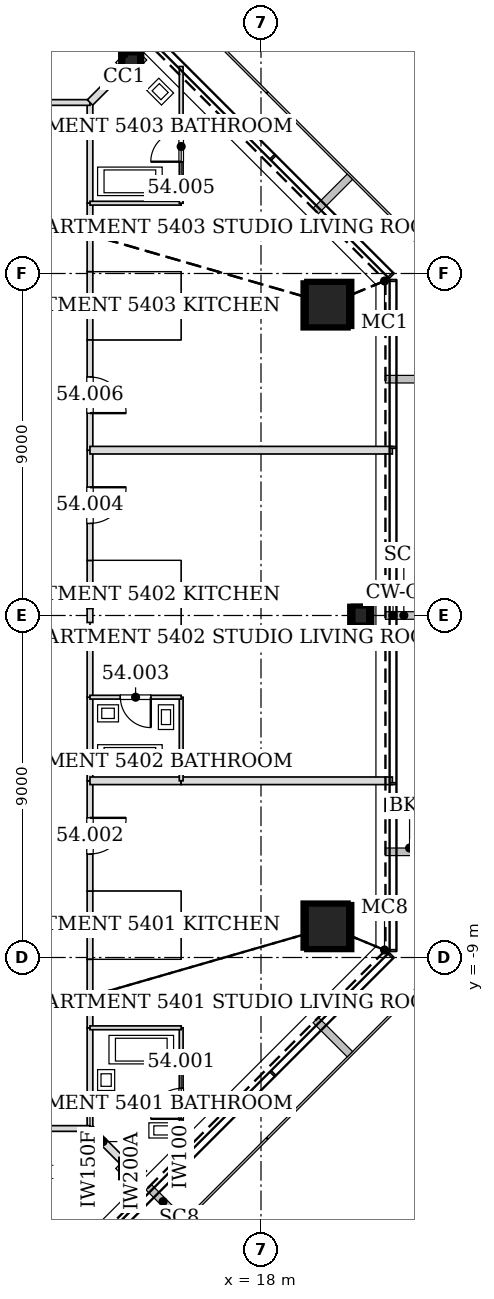
"""IFC4 building model, lengths in metres.
Left out: names, types, materials, properties, quantities, classifications, styles, units other than length and angle.
Written with IfcOpenShell. Run it as: python <this file> out.ifc"""

import sys

from ifc_helpers import new_model, si_unit, direction, frame, frame_2d, origin, origin_2d, place, context, subcontext, project, spatial, rectangle, hollow_rectangle, extrude, element, fill, save


model = new_model("IFC4")
c1 = context("Model", 3, precision=1e-05, world=origin(), true_north=direction((0.0, 1.0)))
c2 = subcontext(c1, "Body", "Model", "MODEL_VIEW")
j1 = project(units=[si_unit("LENGTHUNIT", "METRE"), si_unit("PLANEANGLEUNIT", "RADIAN")], contexts=[c1])
p1 = place(None, origin())
s1 = spatial("IfcSite", under=j1, at=p1, CompositionType="ELEMENT")
p2 = place(p1, origin())
s2 = spatial("IfcBuilding", under=s1, at=p2, CompositionType="ELEMENT")
p3 = place(p2, frame((0.0, 0.0, 231.2)))
s3 = spatial("IfcBuildingStorey", under=s2, at=p3, CompositionType="ELEMENT", Elevation=231.2)
for number, where, z_axis, x_axis in (
    (1, (19.796, 8.2, 0.0), (-0.028, -0.012, 1.0), (0.384, -0.923, 0.0)),
    (2, (19.796, -8.2, 0.0), (-0.028, 0.012, 1.0), (-0.384, -0.923, 0.0)),
):
    element("IfcColumn", number, at=place(p3, frame(where, z_axis=z_axis, x_axis=x_axis)), inside=s3, PredefinedType="COLUMN", context=c2, shape_type="SweptSolid", body=[
        extrude(hollow_rectangle(XDim=1.2, YDim=1.2, WallThickness=0.055, at=origin_2d()), origin(), (0.0, 0.0, 1.0), 3.402),
    ])
for number, where, z_axis, x_axis in (
    (3, (20.674, 0.0, 0.0), (-0.028, 0.0, 1.0), (0.0, -1.0, 0.0)),
    (4, (14.619, 14.619, 0.0), (-0.02, -0.02, 1.0), (0.707, -0.707, 0.0)),
    (5, (14.619, -14.619, 0.0), (-0.02, 0.02, 1.0), (-0.707, -0.707, 0.0)),
):
    element("IfcColumn", number, at=place(p3, frame(where, z_axis=z_axis, x_axis=x_axis)), inside=s3, PredefinedType="COLUMN", context=c2, shape_type="SweptSolid", body=[
        extrude(hollow_rectangle(XDim=0.5, YDim=0.5, WallThickness=0.025, at=origin_2d()), origin(), (0.0, 0.0, 1.0), 3.402),
    ])
p4 = place(p3, frame((13.5, -13.5, 0.0), z_axis=(0.0, 0.0, 1.0), x_axis=(0.0, 1.0, 0.0)))
e6 = element("IfcWall", 6, at=p4, inside=s3, PredefinedType="PARTITIONING", context=c2, shape_type="SweptSolid", body=[
    extrude(rectangle(XDim=2.651, YDim=0.15, at=frame_2d((1.325, 0.0))), origin(), (0.0, 0.0, 1.0), 2.583),
])
p5 = place(p3, frame((13.5, -9.051, 0.0), z_axis=(0.0, 0.0, 1.0), x_axis=(0.0, 1.0, 0.0)))
e7 = element("IfcWall", 7, at=p5, inside=s3, PredefinedType="PARTITIONING", context=c2, shape_type="SweptSolid", body=[
    extrude(rectangle(XDim=1.802, YDim=0.15, at=frame_2d((0.901, 0.0))), origin(), (0.0, 0.0, 1.0), 3.2),
])
p6 = place(p3, frame((13.5, -10.851, 0.0), z_axis=(0.0, 0.0, 1.0), x_axis=(0.0, 1.0, 0.0)))
e8 = element("IfcWall", 8, at=p6, inside=s3, PredefinedType="PARTITIONING", context=c2, shape_type="SweptSolid", body=[
    extrude(rectangle(XDim=1.802, YDim=0.15, at=frame_2d((0.901, 0.0))), origin(), (0.0, 0.0, 1.0), 2.344),
])
p7 = place(p3, frame((13.5, -7.251, 0.0), z_axis=(0.0, 0.0, 1.0), x_axis=(0.0, 1.0, 0.0)))
e9 = element("IfcWall", 9, at=p7, inside=s3, PredefinedType="PARTITIONING", context=c2, shape_type="SweptSolid", body=[
    extrude(rectangle(XDim=2.902, YDim=0.15, at=frame_2d((1.451, 0.0))), origin(), (0.0, 0.0, 1.0), 3.2),
])
p8 = place(p7, frame((0.976, 0.0, 0.0)))
e10 = element("IfcOpeningElement", 10, at=p8, cuts=e9, PredefinedType="OPENING", context=c2, shape_type="SweptSolid", body=[
    extrude(rectangle(XDim=0.95, YDim=2.1, at=frame_2d((0.475, 1.05))), frame((0.0, 0.085, 0.0), z_axis=(0.0, -1.0, 0.0), x_axis=(1.0, 0.0, 0.0)), (0.0, 0.0, 1.0), 0.17),
])
p9 = place(p3, frame((13.5, -4.351, 0.0), z_axis=(0.0, 0.0, 1.0), x_axis=(0.0, 1.0, 0.0)))
e11 = element("IfcWall", 11, at=p9, inside=s3, PredefinedType="PARTITIONING", context=c2, shape_type="SweptSolid", body=[
    extrude(rectangle(XDim=2.202, YDim=0.15, at=frame_2d((1.101, 0.0))), origin(), (0.0, 0.0, 1.0), 3.2),
])
p10 = place(p3, frame((13.5, 0.184, 0.0), z_axis=(0.0, 0.0, 1.0), x_axis=(0.0, 1.0, 0.0)))
e12 = element("IfcWall", 12, at=p10, inside=s3, PredefinedType="PARTITIONING", context=c2, shape_type="SweptSolid", body=[
    extrude(rectangle(XDim=1.267, YDim=0.15, at=frame_2d((0.634, 0.0))), origin(), (0.0, 0.0, 1.0), 3.2),
])
p11 = place(p3, frame((13.5, -0.184, 0.0), z_axis=(0.0, 0.0, 1.0), x_axis=(0.0, 1.0, 0.0)))
e13 = element("IfcWall", 13, at=p11, inside=s3, PredefinedType="PARTITIONING", context=c2, shape_type="SweptSolid", body=[
    extrude(rectangle(XDim=0.367, YDim=0.15, at=frame_2d((0.184, 0.0))), origin(), (0.0, 0.0, 1.0), 2.253),
])
p12 = place(p3, frame((13.5, -2.151, 0.0), z_axis=(0.0, 0.0, 1.0), x_axis=(0.0, 1.0, 0.0)))
e14 = element("IfcWall", 14, at=p12, inside=s3, PredefinedType="PARTITIONING", context=c2, shape_type="SweptSolid", body=[
    extrude(rectangle(XDim=1.802, YDim=0.15, at=frame_2d((0.901, 0.0))), origin(), (0.0, 0.0, 1.0), 3.2),
])
p13 = place(p3, frame((13.5, 1.449, 0.0), z_axis=(0.0, 0.0, 1.0), x_axis=(0.0, 1.0, 0.0)))
e15 = element("IfcWall", 15, at=p13, inside=s3, PredefinedType="PARTITIONING", context=c2, shape_type="SweptSolid", body=[
    extrude(rectangle(XDim=2.902, YDim=0.15, at=frame_2d((1.451, 0.0))), origin(), (0.0, 0.0, 1.0), 3.2),
])
p14 = place(p13, frame((0.976, 0.0, 0.0)))
e16 = element("IfcOpeningElement", 16, at=p14, cuts=e15, PredefinedType="OPENING", context=c2, shape_type="SweptSolid", body=[
    extrude(rectangle(XDim=0.95, YDim=2.1, at=frame_2d((0.475, 1.05))), frame((0.0, 0.085, 0.0), z_axis=(0.0, -1.0, 0.0), x_axis=(1.0, 0.0, 0.0)), (0.0, 0.0, 1.0), 0.17),
])
p15 = place(p3, frame((13.5, 10.849, 0.0), z_axis=(0.0, 0.0, 1.0), x_axis=(0.0, 1.0, 0.0)))
e17 = element("IfcWall", 17, at=p15, inside=s3, PredefinedType="PARTITIONING", context=c2, shape_type="SweptSolid", body=[
    extrude(rectangle(XDim=2.651, YDim=0.15, at=frame_2d((1.325, 0.0))), origin(), (0.0, 0.0, 1.0), 2.583),
])
p16 = place(p3, frame((13.5, 7.249, 0.0), z_axis=(0.0, 0.0, 1.0), x_axis=(0.0, 1.0, 0.0)))
e18 = element("IfcWall", 18, at=p16, inside=s3, PredefinedType="PARTITIONING", context=c2, shape_type="SweptSolid", body=[
    extrude(rectangle(XDim=1.802, YDim=0.15, at=frame_2d((0.901, 0.0))), origin(), (0.0, 0.0, 1.0), 3.2),
])
p17 = place(p3, frame((13.5, 4.349, 0.0), z_axis=(0.0, 0.0, 1.0), x_axis=(0.0, 1.0, 0.0)))
e19 = element("IfcWall", 19, at=p17, inside=s3, PredefinedType="PARTITIONING", context=c2, shape_type="SweptSolid", body=[
    extrude(rectangle(XDim=2.902, YDim=0.15, at=frame_2d((1.451, 0.0))), origin(), (0.0, 0.0, 1.0), 3.2),
])
p18 = place(p17, frame((0.976, 0.0, 0.0)))
e20 = element("IfcOpeningElement", 20, at=p18, cuts=e19, PredefinedType="OPENING", context=c2, shape_type="SweptSolid", body=[
    extrude(rectangle(XDim=0.95, YDim=2.1, at=frame_2d((0.475, 1.05))), frame((0.0, 0.085, 0.0), z_axis=(0.0, -1.0, 0.0), x_axis=(1.0, 0.0, 0.0)), (0.0, 0.0, 1.0), 0.17),
])
p19 = place(p3, frame((13.5, 9.049, 0.0), z_axis=(0.0, 0.0, 1.0), x_axis=(0.0, 1.0, 0.0)))
e21 = element("IfcWall", 21, at=p19, inside=s3, PredefinedType="PARTITIONING", context=c2, shape_type="SweptSolid", body=[
    extrude(rectangle(XDim=1.802, YDim=0.15, at=frame_2d((0.901, 0.0))), origin(), (0.0, 0.0, 1.0), 2.344),
])
p20 = place(p3, frame((13.5, 13.5, 0.0), z_axis=(0.0, 0.0, 1.0), x_axis=(-1.0, 0.0, 0.0)))
e22 = element("IfcWall", 22, at=p20, inside=s3, PredefinedType="PARTITIONING", context=c2, shape_type="SweptSolid", body=[
    extrude(rectangle(XDim=4.051, YDim=0.15, at=frame_2d((2.025, 0.0))), origin(), (0.0, 0.0, 1.0), 2.344),
])
p21 = place(p3, frame((8.199, -13.5, 0.0), z_axis=(0.0, 0.0, 1.0), x_axis=(1.0, 0.0, 0.0)))
e23 = element("IfcWall", 23, at=p21, inside=s3, PredefinedType="PARTITIONING", context=c2, shape_type="SweptSolid", body=[
    extrude(rectangle(XDim=5.301, YDim=0.15, at=frame_2d((2.65, 0.0))), origin(), (0.0, 0.0, 1.0), 2.344),
])
p22 = place(p3, frame((15.9, -14.448, 0.0), z_axis=(0.0, 0.0, 1.0), x_axis=(0.0, 1.0, 0.0)))
e24 = element("IfcWall", 24, at=p22, inside=s3, PredefinedType="PARTITIONING", context=c2, shape_type="SweptSolid", body=[
    extrude(rectangle(XDim=3.597, YDim=0.1, at=frame_2d((1.799, 0.0))), origin(), (0.0, 0.0, 1.0), 2.784),
])
p23 = place(p22, frame((1.202, 0.0, 0.0)))
e25 = element("IfcOpeningElement", 25, at=p23, cuts=e24, PredefinedType="OPENING", context=c2, shape_type="SweptSolid", body=[
    extrude(rectangle(XDim=0.8, YDim=2.1, at=frame_2d((0.4, 1.05))), frame((0.0, 0.06, 0.0), z_axis=(0.0, -1.0, 0.0), x_axis=(1.0, 0.0, 0.0)), (0.0, 0.0, 1.0), 0.12),
])
p24 = place(p3, frame((15.9, -10.85, 0.0), z_axis=(0.0, 0.0, 1.0), x_axis=(-1.0, 0.0, 0.0)))
e26 = element("IfcWall", 26, at=p24, inside=s3, PredefinedType="PARTITIONING", context=c2, shape_type="SweptSolid", body=[
    extrude(rectangle(XDim=2.4, YDim=0.1, at=frame_2d((1.2, 0.0))), origin(), (0.0, 0.0, 1.0), 2.786),
])
p25 = place(p3, frame((13.5, -13.5, 0.0), z_axis=(0.0, 0.0, 1.0), x_axis=(0.707106781187, -0.707106781187, 0.0)))
e27 = element("IfcWall", 27, at=p25, inside=s3, PredefinedType="PARTITIONING", context=c2, shape_type="SweptSolid", body=[
    extrude(rectangle(XDim=1.217, YDim=0.2, at=frame_2d((0.608, 0.0))), origin(), (0.0, 0.0, 1.0), 2.583),
])
p26 = place(p3, frame((15.901, -4.35, 0.0), z_axis=(0.0, 0.0, 1.0), x_axis=(-1.0, 0.0, 0.0)))
e28 = element("IfcWall", 28, at=p26, inside=s3, PredefinedType="PARTITIONING", context=c2, shape_type="SweptSolid", body=[
    extrude(rectangle(XDim=2.401, YDim=0.2, at=frame_2d((1.2, 0.0))), origin(), (0.0, 0.0, 1.0), 2.664),
])
p27 = place(p3, frame((21.456, -4.35, 0.0), z_axis=(0.0, 0.0, 1.0), x_axis=(-1.0, 0.0, 0.0)))
e29 = element("IfcWall", 29, at=p27, inside=s3, PredefinedType="PARTITIONING", context=c2, shape_type="SweptSolid", body=[
    extrude(rectangle(XDim=5.557, YDim=0.2, at=frame_2d((2.779, 0.0))), origin(), (0.0, 0.0, 1.0), 2.662),
])
p28 = place(p3, frame((15.9, -4.35, 0.0), z_axis=(0.0, 0.0, 1.0), x_axis=(0.0, 1.0, 0.0)))
e30 = element("IfcWall", 30, at=p28, inside=s3, PredefinedType="PARTITIONING", context=c2, shape_type="SweptSolid", body=[
    extrude(rectangle(XDim=2.2, YDim=0.1, at=frame_2d((1.1, 0.0))), origin(), (0.0, 0.0, 1.0), 3.2),
])
p29 = place(p3, frame((15.9, -2.15, 0.0), z_axis=(0.0, 0.0, 1.0), x_axis=(-1.0, 0.0, 0.0)))
e31 = element("IfcWall", 31, at=p29, inside=s3, PredefinedType="PARTITIONING", context=c2, shape_type="SweptSolid", body=[
    extrude(rectangle(XDim=2.4, YDim=0.1, at=frame_2d((1.2, 0.0))), origin(), (0.0, 0.0, 1.0), 2.664),
])
p30 = place(p29, frame((0.8, 0.0, 0.0)))
e32 = element("IfcOpeningElement", 32, at=p30, cuts=e31, PredefinedType="OPENING", context=c2, shape_type="SweptSolid", body=[
    extrude(rectangle(XDim=0.8, YDim=2.1, at=frame_2d((0.4, 1.05))), frame((0.0, 0.06, 0.0), z_axis=(0.0, -1.0, 0.0), x_axis=(1.0, 0.0, 0.0)), (0.0, 0.0, 1.0), 0.12),
])
p31 = place(p3, frame((21.456, 4.35, 0.0), z_axis=(0.0, 0.0, 1.0), x_axis=(-1.0, 0.0, 0.0)))
e33 = element("IfcWall", 33, at=p31, inside=s3, PredefinedType="PARTITIONING", context=c2, shape_type="SweptSolid", body=[
    extrude(rectangle(XDim=7.956, YDim=0.2, at=frame_2d((3.978, 0.0))), origin(), (0.0, 0.0, 1.0), 2.662),
])
p32 = place(p3, frame((13.5, 10.85, 0.0), z_axis=(0.0, 0.0, 1.0), x_axis=(1.0, 0.0, 0.0)))
e34 = element("IfcWall", 34, at=p32, inside=s3, PredefinedType="PARTITIONING", context=c2, shape_type="SweptSolid", body=[
    extrude(rectangle(XDim=2.4, YDim=0.1, at=frame_2d((1.2, 0.0))), origin(), (0.0, 0.0, 1.0), 2.786),
])
p33 = place(p3, frame((15.9, 10.85, 0.0), z_axis=(0.0, 0.0, 1.0), x_axis=(0.0, 1.0, 0.0)))
e35 = element("IfcWall", 35, at=p33, inside=s3, PredefinedType="PARTITIONING", context=c2, shape_type="SweptSolid", body=[
    extrude(rectangle(XDim=3.597, YDim=0.1, at=frame_2d((1.799, 0.0))), origin(), (0.0, 0.0, 1.0), 2.784),
])
p34 = place(p33, frame((1.092, 0.0, 0.0)))
e36 = element("IfcOpeningElement", 36, at=p34, cuts=e35, PredefinedType="OPENING", context=c2, shape_type="SweptSolid", body=[
    extrude(rectangle(XDim=0.8, YDim=2.1, at=frame_2d((0.4, 1.05))), frame((0.0, 0.06, 0.0), z_axis=(0.0, -1.0, 0.0), x_axis=(1.0, 0.0, 0.0)), (0.0, 0.0, 1.0), 0.12),
])
p35 = place(p3, frame((14.361, 14.361, 0.0), z_axis=(0.0, 0.0, 1.0), x_axis=(-0.707106781187, -0.707106781187, 0.0)))
e37 = element("IfcWall", 37, at=p35, inside=s3, PredefinedType="PARTITIONING", context=c2, shape_type="SweptSolid", body=[
    extrude(rectangle(XDim=1.217, YDim=0.2, at=frame_2d((0.608, 0.0))), origin(), (0.0, 0.0, 1.0), 2.583),
])
p36 = place(p23, origin())
e38 = element("IfcDoor", 38, at=p36, inside=s3, OperationType="SINGLE_SWING_LEFT", PredefinedType="DOOR", context=c2, shape_type="SweptSolid", body=[
    extrude(rectangle(XDim=0.8, YDim=2.1, at=frame_2d((0.4, 1.05))), frame((0.0, 0.025, 0.0), z_axis=(0.0, -1.0, 0.0), x_axis=(1.0, 0.0, 0.0)), (0.0, 0.0, 1.0), 0.05),
])
fill(e25, e38)
p37 = place(p8, frame((0.95, 0.0, 0.0), z_axis=(0.0, 0.0, 1.0), x_axis=(-1.0, 0.0, 0.0)))
e39 = element("IfcDoor", 39, at=p37, inside=s3, OperationType="SINGLE_SWING_LEFT", PredefinedType="DOOR", context=c2, shape_type="SweptSolid", body=[
    extrude(rectangle(XDim=0.95, YDim=2.1, at=frame_2d((0.475, 1.05))), frame((0.0, 0.025, 0.0), z_axis=(0.0, -1.0, 0.0), x_axis=(1.0, 0.0, 0.0)), (0.0, 0.0, 1.0), 0.05),
])
fill(e10, e39)
p38 = place(p30, origin())
e40 = element("IfcDoor", 40, at=p38, inside=s3, OperationType="SINGLE_SWING_LEFT", PredefinedType="DOOR", context=c2, shape_type="SweptSolid", body=[
    extrude(rectangle(XDim=0.8, YDim=2.1, at=frame_2d((0.4, 1.05))), frame((0.0, 0.025, 0.0), z_axis=(0.0, -1.0, 0.0), x_axis=(1.0, 0.0, 0.0)), (0.0, 0.0, 1.0), 0.05),
])
fill(e32, e40)
p39 = place(p14, frame((0.95, 0.0, 0.0), z_axis=(0.0, 0.0, 1.0), x_axis=(-1.0, 0.0, 0.0)))
e41 = element("IfcDoor", 41, at=p39, inside=s3, OperationType="SINGLE_SWING_LEFT", PredefinedType="DOOR", context=c2, shape_type="SweptSolid", body=[
    extrude(rectangle(XDim=0.95, YDim=2.1, at=frame_2d((0.475, 1.05))), frame((0.0, 0.025, 0.0), z_axis=(0.0, -1.0, 0.0), x_axis=(1.0, 0.0, 0.0)), (0.0, 0.0, 1.0), 0.05),
])
fill(e16, e41)
p40 = place(p34, origin())
e42 = element("IfcDoor", 42, at=p40, inside=s3, OperationType="SINGLE_SWING_LEFT", PredefinedType="DOOR", context=c2, shape_type="SweptSolid", body=[
    extrude(rectangle(XDim=0.8, YDim=2.1, at=frame_2d((0.4, 1.05))), frame((0.0, 0.025, 0.0), z_axis=(0.0, -1.0, 0.0), x_axis=(1.0, 0.0, 0.0)), (0.0, 0.0, 1.0), 0.05),
])
fill(e36, e42)
p41 = place(p18, frame((0.95, 0.0, 0.0), z_axis=(0.0, 0.0, 1.0), x_axis=(-1.0, 0.0, 0.0)))
e43 = element("IfcDoor", 43, at=p41, inside=s3, OperationType="SINGLE_SWING_RIGHT", PredefinedType="DOOR", context=c2, shape_type="SweptSolid", body=[
    extrude(rectangle(XDim=0.95, YDim=2.1, at=frame_2d((0.475, 1.05))), frame((0.0, 0.025, 0.0), z_axis=(0.0, -1.0, 0.0), x_axis=(1.0, 0.0, 0.0)), (0.0, 0.0, 1.0), 0.05),
])
fill(e20, e43)
save(model, sys.argv[1])
